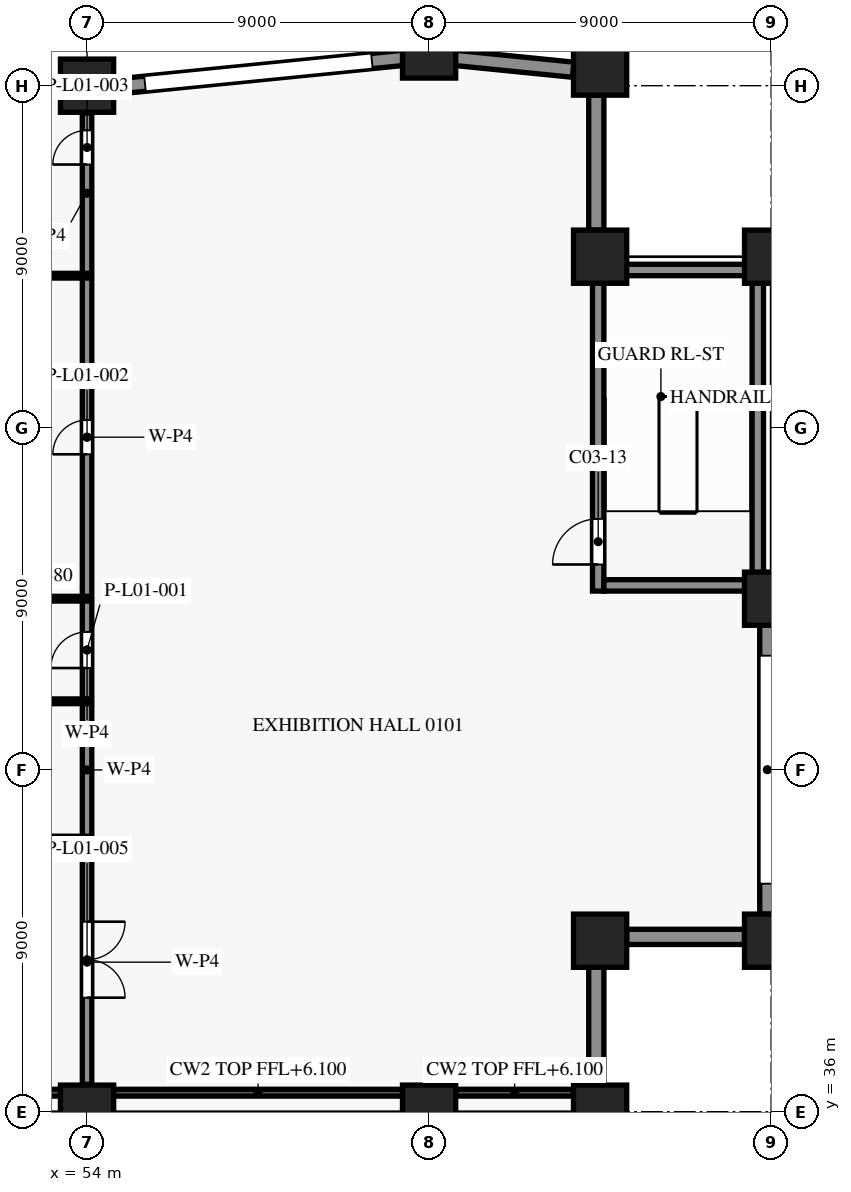
"""IFC4 building model, lengths in metres.
Left out: names, types, materials, properties, quantities, classifications, styles, units other than length and angle.
Written with IfcOpenShell. Run it as: python <this file> out.ifc"""

import sys

from ifc_helpers import new_model, si_unit, direction, frame, frame_2d, origin, origin_2d, place, context, subcontext, project, spatial, rectangle, extrude, element, fill, save


model = new_model("IFC4")
c1 = context("Model", 3, precision=1e-05, world=origin(), true_north=direction((0.0, 1.0)))
c2 = subcontext(c1, "Body", "Model", "MODEL_VIEW")
j1 = project(units=[si_unit("LENGTHUNIT", "METRE"), si_unit("PLANEANGLEUNIT", "RADIAN")], contexts=[c1])
p1 = place(None, origin())
s1 = spatial("IfcSite", under=j1, at=p1, CompositionType="ELEMENT")
p2 = place(p1, origin())
s2 = spatial("IfcBuilding", under=s1, at=p2, CompositionType="ELEMENT")
p3 = place(p2, frame((0.0, 0.0, 7.5)))
s3 = spatial("IfcBuildingStorey", under=s2, at=p3, CompositionType="ELEMENT", Elevation=7.5)
for number, where, z_axis, x_axis in (
    (1, (54.0, 36.0, 0.0), (0.0, 0.0, 1.0), (1.0, 0.0, 0.0)),
    (2, (63.0, 36.0, 0.0), (0.0, 0.0, 1.0), (1.0, 0.0, 0.0)),
    (3, (67.5, 36.0, 0.0), (0.0, 0.0, 1.0), (1.0, 0.0, 0.0)),
    (4, (72.0, 40.5, 0.0), (0.0, 0.0, 1.0), (1.0, 0.0, 0.0)),
    (5, (72.0, 49.5, 0.0), (0.0, 0.0, 1.0), (1.0, 0.0, 0.0)),
    (6, (72.0, 58.5, 0.0), (0.0, 0.0, 1.0), (1.0, 0.0, 0.0)),
    (7, (67.5, 63.45, 0.0), (0.0, 0.0, 1.0), (1.0, 0.0, 0.0)),
    (8, (63.0, 63.9, 0.0), (0.0, 0.0, 1.0), (1.0, 0.0, 0.0)),
    (9, (54.0, 63.0, 0.0), (0.0, 0.0, 1.0), (1.0, 0.0, 0.0)),
    (10, (67.5, 40.5, 0.0), (0.0, 0.0, 1.0), (1.0, 0.0, 0.0)),
    (11, (67.5, 58.5, 0.0), (0.0, 0.0, 1.0), (1.0, 0.0, 0.0)),
):
    element("IfcColumn", number, at=place(p3, frame(where, z_axis=z_axis, x_axis=x_axis)), inside=s3, PredefinedType="COLUMN", context=c2, shape_type="SweptSolid", body=[
        extrude(rectangle(XDim=1.4, YDim=1.4, at=origin_2d()), origin(), (0.0, 0.0, 1.0), 7.0),
    ])
for number, where, z_axis, x_axis in (
    (12, (67.4, 39.8, 0.0), (0.0, 0.0, 1.0), (0.0, -1.0, 0.0)),
    (13, (71.3, 40.6, 0.0), (0.0, 0.0, 1.0), (-1.0, 0.0, 0.0)),
):
    element("IfcWall", number, at=place(p3, frame(where, z_axis=z_axis, x_axis=x_axis)), inside=s3, PredefinedType="SOLIDWALL", context=c2, shape_type="SweptSolid", body=[
        extrude(rectangle(XDim=3.1, YDim=0.4, at=frame_2d((1.55, 0.0))), origin(), (0.0, 0.0, 1.0), 6.1),
    ])
p4 = place(p3, frame((71.9, 48.8, 0.0), z_axis=(0.0, 0.0, 1.0), x_axis=(0.0, -1.0, 0.0)))
e14 = element("IfcWall", 14, at=p4, inside=s3, PredefinedType="SOLIDWALL", context=c2, shape_type="SweptSolid", body=[
    extrude(rectangle(XDim=7.6, YDim=0.4, at=frame_2d((3.8, 0.0))), origin(), (0.0, 0.0, 1.0), 6.1),
])
p5 = place(p4, frame((0.8, 0.0, 0.9)))
e15 = element("IfcOpeningElement", 15, at=p5, cuts=e14, PredefinedType="OPENING", context=c2, shape_type="SweptSolid", body=[
    extrude(rectangle(XDim=6.0, YDim=1.8, at=frame_2d((3.0, 0.9))), frame((0.0, 0.21, 0.0), z_axis=(0.0, -1.0, 0.0), x_axis=(1.0, 0.0, 0.0)), (0.0, 0.0, 1.0), 0.42),
])
p6 = place(p3, frame((67.4, 62.75, 0.0), z_axis=(0.0, 0.0, 1.0), x_axis=(0.0, -1.0, 0.0)))
e16 = element("IfcWall", 16, at=p6, inside=s3, PredefinedType="SOLIDWALL", context=c2, shape_type="SweptSolid", body=[
    extrude(rectangle(XDim=3.55, YDim=0.4, at=frame_2d((1.775, 0.0))), origin(), (0.0, 0.0, 1.0), 6.1),
])
p7 = place(p3, frame((63.687, 63.731, 0.0), z_axis=(0.0, 0.0, 1.0), x_axis=(0.995041834057, -0.099457269599, 0.0)))
e17 = element("IfcWall", 17, at=p7, inside=s3, PredefinedType="SOLIDWALL", context=c2, shape_type="SweptSolid", body=[
    extrude(rectangle(XDim=3.122, YDim=0.4, at=frame_2d((1.561, 0.0))), origin(), (0.0, 0.0, 1.0), 6.1),
])
p8 = place(p3, frame((54.707, 62.97, 0.0), z_axis=(0.0, 0.0, 1.0), x_axis=(0.995039719416, 0.099478423711, 0.0)))
e18 = element("IfcWall", 18, at=p8, inside=s3, PredefinedType="SOLIDWALL", context=c2, shape_type="SweptSolid", body=[
    extrude(rectangle(XDim=7.645, YDim=0.4, at=frame_2d((3.822, 0.0))), origin(), (0.0, 0.0, 1.0), 6.1),
])
p9 = place(p8, frame((0.823, 0.0, 0.9)))
e19 = element("IfcOpeningElement", 19, at=p9, cuts=e18, PredefinedType="OPENING", context=c2, shape_type="SweptSolid", body=[
    extrude(rectangle(XDim=6.0, YDim=1.8, at=frame_2d((3.0, 0.9))), frame((0.0, 0.21, 0.0), z_axis=(0.0, -1.0, 0.0), x_axis=(1.0, 0.0, 0.0)), (0.0, 0.0, 1.0), 0.42),
])
p10 = place(p3, frame((45.687, 63.731, 0.0), z_axis=(0.0, 0.0, 1.0), x_axis=(0.995039719416, -0.099478423711, 0.0)))
e20 = element("IfcWall", 20, at=p10, inside=s3, PredefinedType="SOLIDWALL", context=c2, shape_type="SweptSolid", body=[
    extrude(rectangle(XDim=7.645, YDim=0.4, at=frame_2d((3.822, 0.0))), origin(), (0.0, 0.0, 1.0), 6.1),
])
p11 = place(p10, frame((0.823, 0.0, 0.9)))
e21 = element("IfcOpeningElement", 21, at=p11, cuts=e20, PredefinedType="OPENING", context=c2, shape_type="SweptSolid", body=[
    extrude(rectangle(XDim=6.0, YDim=1.8, at=frame_2d((3.0, 0.9))), frame((0.0, 0.21, 0.0), z_axis=(0.0, -1.0, 0.0), x_axis=(1.0, 0.0, 0.0)), (0.0, 0.0, 1.0), 0.42),
])
for number, where, z_axis, x_axis in (
    (22, (67.6, 49.85, 0.0), (0.0, 0.0, 1.0), (1.0, 0.0, 0.0)),
    (23, (67.6, 58.15, 0.0), (0.0, 0.0, 1.0), (1.0, 0.0, 0.0)),
):
    element("IfcWall", number, at=place(p3, frame(where, z_axis=z_axis, x_axis=x_axis)), inside=s3, PredefinedType="SHEAR", context=c2, shape_type="SweptSolid", body=[
        extrude(rectangle(XDim=3.9, YDim=0.3, at=frame_2d((1.95, 0.0))), origin(), (0.0, 0.0, 1.0), 6.7),
    ])
p12 = place(p3, frame((67.45, 49.7, 0.0), z_axis=(0.0, 0.0, 1.0), x_axis=(0.0, 1.0, 0.0)))
e24 = element("IfcWall", 24, at=p12, inside=s3, PredefinedType="SHEAR", context=c2, shape_type="SweptSolid", body=[
    extrude(rectangle(XDim=8.6, YDim=0.3, at=frame_2d((4.3, 0.0))), origin(), (0.0, 0.0, 1.0), 6.7),
])
p13 = place(p12, frame((0.7, 0.0, 0.0)))
e25 = element("IfcOpeningElement", 25, at=p13, cuts=e24, PredefinedType="OPENING", context=c2, shape_type="SweptSolid", body=[
    extrude(rectangle(XDim=1.2, YDim=2.2, at=frame_2d((0.6, 1.1))), frame((0.0, 0.16, 0.0), z_axis=(0.0, -1.0, 0.0), x_axis=(1.0, 0.0, 0.0)), (0.0, 0.0, 1.0), 0.32),
])
p14 = place(p3, frame((71.65, 49.7, 0.0), z_axis=(0.0, 0.0, 1.0), x_axis=(0.0, 1.0, 0.0)))
e26 = element("IfcWall", 26, at=p14, inside=s3, PredefinedType="SHEAR", context=c2, shape_type="SweptSolid", body=[
    extrude(rectangle(XDim=8.6, YDim=0.3, at=frame_2d((4.3, 0.0))), origin(), (0.0, 0.0, 1.0), 6.7),
])
p15 = place(p3, frame((54.0, 43.15, 0.0), z_axis=(0.0, 0.0, 1.0), x_axis=(0.0, -1.0, 0.0)))
e27 = element("IfcWall", 27, at=p15, inside=s3, PredefinedType="PARTITIONING", context=c2, shape_type="SweptSolid", body=[
    extrude(rectangle(XDim=6.43, YDim=0.25, at=frame_2d((3.215, 0.0))), origin(), (0.0, 0.0, 1.0), 5.98),
])
p16 = place(p15, frame((2.15, 0.0, 0.0)))
e28 = element("IfcOpeningElement", 28, at=p16, cuts=e27, PredefinedType="OPENING", context=c2, shape_type="SweptSolid", body=[
    extrude(rectangle(XDim=2.0, YDim=2.1, at=frame_2d((1.0, 1.05))), frame((0.0, 0.135, 0.0), z_axis=(0.0, -1.0, 0.0), x_axis=(1.0, 0.0, 0.0)), (0.0, 0.0, 1.0), 0.27),
])
p17 = place(p3, frame((51.3, 43.2, 0.0), z_axis=(0.0, 0.0, 1.0), x_axis=(1.0, 0.0, 0.0)))
e29 = element("IfcWall", 29, at=p17, inside=s3, PredefinedType="PARTITIONING", context=c2, shape_type="SweptSolid", body=[
    extrude(rectangle(XDim=2.575, YDim=0.1, at=frame_2d((1.288, 0.0))), origin(), (0.0, 0.0, 1.0), 5.98),
])
p18 = place(p3, frame((54.0, 43.25, 0.0), z_axis=(0.0, 0.0, 1.0), x_axis=(0.0, 1.0, 0.0)))
e30 = element("IfcWall", 30, at=p18, inside=s3, PredefinedType="PARTITIONING", context=c2, shape_type="SweptSolid", body=[
    extrude(rectangle(XDim=3.488, YDim=0.25, at=frame_2d((1.744, 0.0))), origin(), (0.0, 0.0, 1.0), 5.98),
])
p19 = place(p3, frame((53.875, 46.8, 0.0), z_axis=(0.0, 0.0, 1.0), x_axis=(-1.0, 0.0, 0.0)))
e31 = element("IfcWall", 31, at=p19, inside=s3, PredefinedType="PARTITIONING", context=c2, shape_type="SweptSolid", body=[
    extrude(rectangle(XDim=2.575, YDim=0.125, at=frame_2d((1.288, 0.0))), origin(), (0.0, 0.0, 1.0), 5.98),
])
p20 = place(p3, frame((54.0, 46.863, 0.0), z_axis=(0.0, 0.0, 1.0), x_axis=(0.0, 1.0, 0.0)))
e32 = element("IfcWall", 32, at=p20, inside=s3, PredefinedType="PARTITIONING", context=c2, shape_type="SweptSolid", body=[
    extrude(rectangle(XDim=2.575, YDim=0.25, at=frame_2d((1.288, 0.0))), origin(), (0.0, 0.0, 1.0), 5.98),
])
p21 = place(p20, frame((0.812, 0.0, 0.0)))
e33 = element("IfcOpeningElement", 33, at=p21, cuts=e32, PredefinedType="OPENING", context=c2, shape_type="SweptSolid", body=[
    extrude(rectangle(XDim=0.95, YDim=2.1, at=frame_2d((0.475, 1.05))), frame((0.0, 0.135, 0.0), z_axis=(0.0, -1.0, 0.0), x_axis=(1.0, 0.0, 0.0)), (0.0, 0.0, 1.0), 0.27),
])
p22 = place(p3, frame((45.125, 49.5, 0.0), z_axis=(0.0, 0.0, 1.0), x_axis=(1.0, 0.0, 0.0)))
e34 = element("IfcWall", 34, at=p22, inside=s3, PredefinedType="PARTITIONING", context=c2, shape_type="SweptSolid", body=[
    extrude(rectangle(XDim=8.75, YDim=0.125, at=frame_2d((4.375, 0.0))), origin(), (0.0, 0.0, 1.0), 5.98),
])
p23 = place(p3, frame((54.0, 49.562, 0.0), z_axis=(0.0, 0.0, 1.0), x_axis=(0.0, 1.0, 0.0)))
e35 = element("IfcWall", 35, at=p23, inside=s3, PredefinedType="PARTITIONING", context=c2, shape_type="SweptSolid", body=[
    extrude(rectangle(XDim=8.375, YDim=0.25, at=frame_2d((4.188, 0.0))), origin(), (0.0, 0.0, 1.0), 5.98),
])
p24 = place(p23, frame((3.738, 0.0, 0.0)))
e36 = element("IfcOpeningElement", 36, at=p24, cuts=e35, PredefinedType="OPENING", context=c2, shape_type="SweptSolid", body=[
    extrude(rectangle(XDim=0.9, YDim=2.1, at=frame_2d((0.45, 1.05))), frame((0.0, 0.135, 0.0), z_axis=(0.0, -1.0, 0.0), x_axis=(1.0, 0.0, 0.0)), (0.0, 0.0, 1.0), 0.27),
])
p25 = place(p3, frame((45.125, 58.0, 0.0), z_axis=(0.0, 0.0, 1.0), x_axis=(1.0, 0.0, 0.0)))
e37 = element("IfcWall", 37, at=p25, inside=s3, PredefinedType="PARTITIONING", context=c2, shape_type="SweptSolid", body=[
    extrude(rectangle(XDim=8.75, YDim=0.125, at=frame_2d((4.375, 0.0))), origin(), (0.0, 0.0, 1.0), 5.98),
])
p26 = place(p3, frame((54.0, 58.062, 0.0), z_axis=(0.0, 0.0, 1.0), x_axis=(0.0, 1.0, 0.0)))
e38 = element("IfcWall", 38, at=p26, inside=s3, PredefinedType="PARTITIONING", context=c2, shape_type="SweptSolid", body=[
    extrude(rectangle(XDim=4.218, YDim=0.25, at=frame_2d((2.109, 0.0))), origin(), (0.0, 0.0, 1.0), 5.98),
])
p27 = place(p26, frame((2.863, 0.0, 0.0)))
e39 = element("IfcOpeningElement", 39, at=p27, cuts=e38, PredefinedType="OPENING", context=c2, shape_type="SweptSolid", body=[
    extrude(rectangle(XDim=0.9, YDim=2.1, at=frame_2d((0.45, 1.05))), frame((0.0, 0.135, 0.0), z_axis=(0.0, -1.0, 0.0), x_axis=(1.0, 0.0, 0.0)), (0.0, 0.0, 1.0), 0.27),
])
p28 = place(p5, origin())
e40 = element("IfcWindow", 40, at=p28, inside=s3, PartitioningType="SINGLE_PANEL", PredefinedType="WINDOW", context=c2, shape_type="SweptSolid", body=[
    extrude(rectangle(XDim=6.0, YDim=1.8, at=frame_2d((3.0, 0.9))), frame((0.0, 0.03, 0.0), z_axis=(0.0, -1.0, 0.0), x_axis=(1.0, 0.0, 0.0)), (0.0, 0.0, 1.0), 0.06),
])
fill(e15, e40)
p29 = place(p9, origin())
e41 = element("IfcWindow", 41, at=p29, inside=s3, PartitioningType="SINGLE_PANEL", PredefinedType="WINDOW", context=c2, shape_type="SweptSolid", body=[
    extrude(rectangle(XDim=6.0, YDim=1.8, at=frame_2d((3.0, 0.9))), frame((0.0, 0.03, 0.0), z_axis=(0.0, -1.0, 0.0), x_axis=(1.0, 0.0, 0.0)), (0.0, 0.0, 1.0), 0.06),
])
fill(e19, e41)
p30 = place(p13, origin())
e42 = element("IfcDoor", 42, at=p30, inside=s3, OperationType="SINGLE_SWING_RIGHT", PredefinedType="DOOR", context=c2, shape_type="SweptSolid", body=[
    extrude(rectangle(XDim=1.2, YDim=2.2, at=frame_2d((0.6, 1.1))), frame((0.0, 0.025, 0.0), z_axis=(0.0, -1.0, 0.0), x_axis=(1.0, 0.0, 0.0)), (0.0, 0.0, 1.0), 0.05),
])
fill(e25, e42)
p31 = place(p21, origin())
e43 = element("IfcDoor", 43, at=p31, inside=s3, OperationType="SINGLE_SWING_RIGHT", PredefinedType="DOOR", context=c2, shape_type="SweptSolid", body=[
    extrude(rectangle(XDim=0.95, YDim=2.1, at=frame_2d((0.475, 1.05))), frame((0.0, 0.025, 0.0), z_axis=(0.0, -1.0, 0.0), x_axis=(1.0, 0.0, 0.0)), (0.0, 0.0, 1.0), 0.05),
])
fill(e33, e43)
p32 = place(p24, origin())
e44 = element("IfcDoor", 44, at=p32, inside=s3, OperationType="SINGLE_SWING_RIGHT", PredefinedType="DOOR", context=c2, shape_type="SweptSolid", body=[
    extrude(rectangle(XDim=0.9, YDim=2.1, at=frame_2d((0.45, 1.05))), frame((0.0, 0.025, 0.0), z_axis=(0.0, -1.0, 0.0), x_axis=(1.0, 0.0, 0.0)), (0.0, 0.0, 1.0), 0.05),
])
fill(e36, e44)
p33 = place(p27, origin())
e45 = element("IfcDoor", 45, at=p33, inside=s3, OperationType="SINGLE_SWING_RIGHT", PredefinedType="DOOR", context=c2, shape_type="SweptSolid", body=[
    extrude(rectangle(XDim=0.9, YDim=2.1, at=frame_2d((0.45, 1.05))), frame((0.0, 0.025, 0.0), z_axis=(0.0, -1.0, 0.0), x_axis=(1.0, 0.0, 0.0)), (0.0, 0.0, 1.0), 0.05),
])
fill(e39, e45)
p34 = place(p16, origin())
e46 = element("IfcDoor", 46, at=p34, inside=s3, OperationType="DOUBLE_DOOR_SINGLE_SWING", PredefinedType="DOOR", context=c2, shape_type="SweptSolid", body=[
    extrude(rectangle(XDim=2.0, YDim=2.1, at=frame_2d((1.0, 1.05))), frame((0.0, 0.025, 0.0), z_axis=(0.0, -1.0, 0.0), x_axis=(1.0, 0.0, 0.0)), (0.0, 0.0, 1.0), 0.05),
])
fill(e28, e46)
save(model, sys.argv[1])
